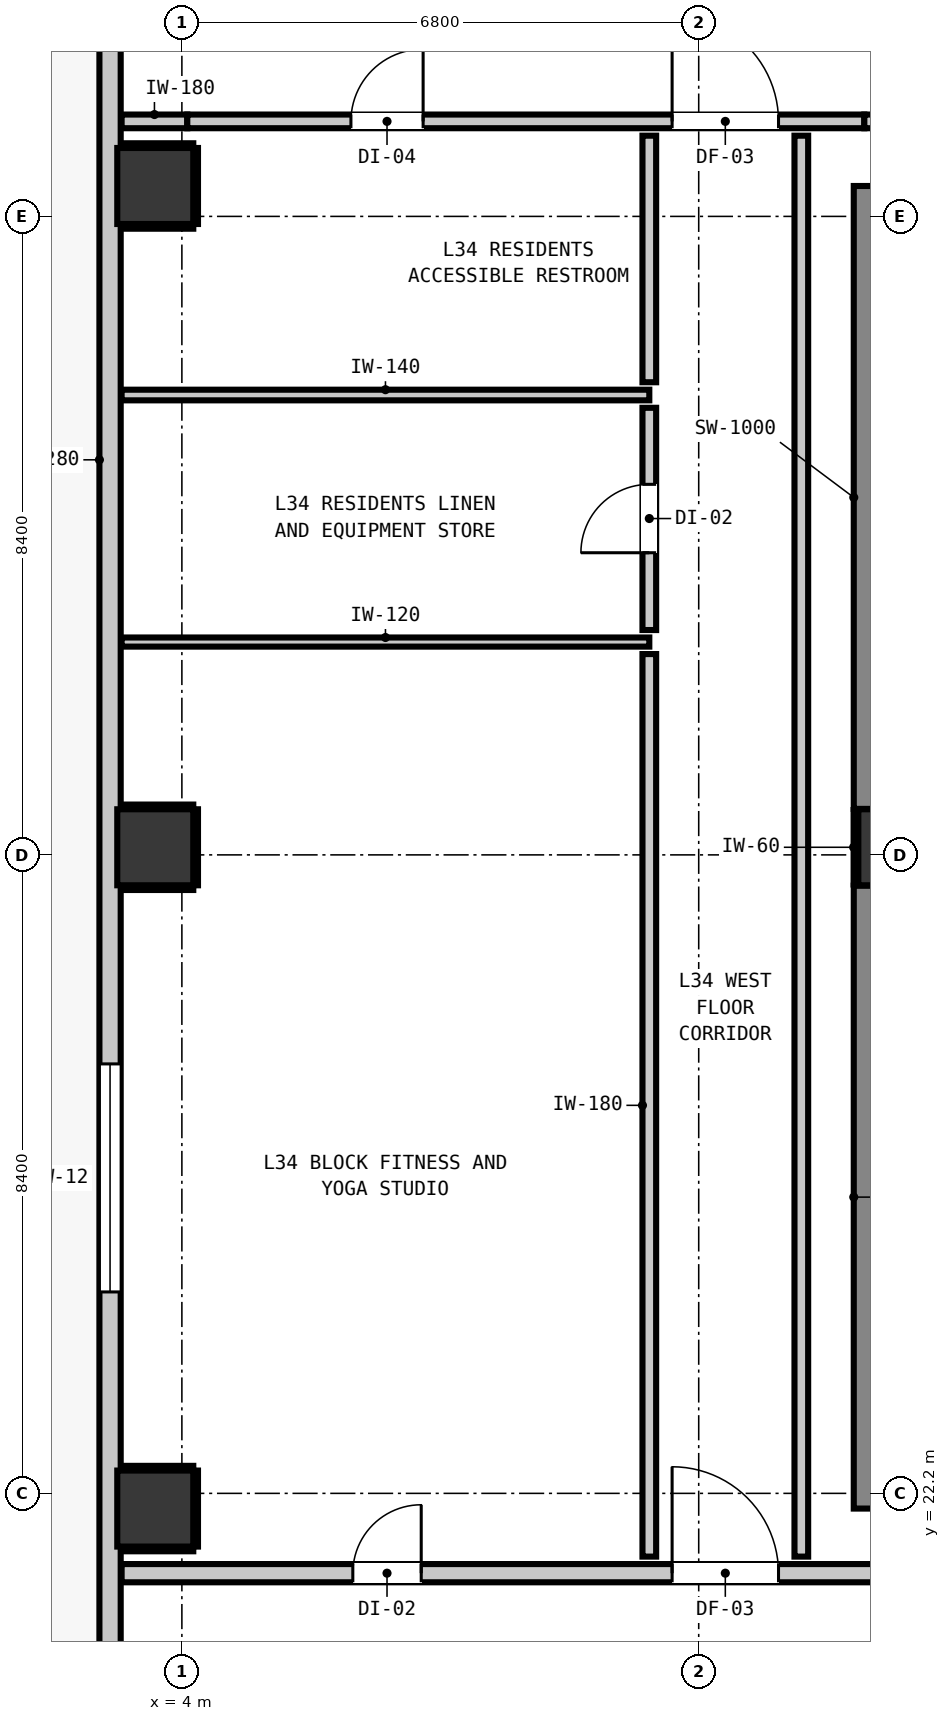
"""IFC4 building model, lengths in metres.
Left out: names, types, materials, properties, quantities, classifications, styles, units other than length and angle.
Written with IfcOpenShell. Run it as: python <this file> out.ifc"""

import sys

from ifc_helpers import new_model, si_unit, direction, frame, frame_2d, origin, origin_2d, place, context, subcontext, project, spatial, rectangle, extrude, element, fill, save


model = new_model("IFC4")
c1 = context("Model", 3, precision=1e-05, world=origin(), true_north=direction((0.0, 1.0)))
c2 = subcontext(c1, "Body", "Model", "MODEL_VIEW")
j1 = project(units=[si_unit("LENGTHUNIT", "METRE"), si_unit("PLANEANGLEUNIT", "RADIAN")], contexts=[c1])
p1 = place(None, origin())
s1 = spatial("IfcSite", under=j1, at=p1, CompositionType="ELEMENT")
p2 = place(p1, origin())
s2 = spatial("IfcBuilding", under=s1, at=p2, CompositionType="ELEMENT")
p3 = place(p2, frame((0.0, 0.0, 119.36)))
s3 = spatial("IfcBuildingStorey", under=s2, at=p3, CompositionType="ELEMENT", Elevation=119.36)
p4 = place(p3, frame((13.4, 30.7, 0.0), z_axis=(0.0, 0.0, 1.0), x_axis=(1.0, 0.0, 0.0)))
e1 = element("IfcColumn", 1, at=p4, inside=s3, PredefinedType="COLUMN", context=c2, shape_type="SweptSolid", body=[
    extrude(rectangle(XDim=1.0, YDim=1.0, at=origin_2d()), origin(), (0.0, 0.0, 1.0), 3.32),
])
p5 = place(p3, frame((13.34, 22.0, 0.0), z_axis=(0.0, 0.0, 1.0), x_axis=(0.0, 1.0, 0.0)))
e2 = element("IfcWall", 2, at=p5, inside=s3, PredefinedType="SHEAR", context=c2, shape_type="SweptSolid", body=[
    extrude(rectangle(XDim=8.195, YDim=1.0, at=frame_2d((4.098, 0.0))), origin(), (0.0, 0.0, 1.0), 3.32),
])
p6 = place(p3, frame((13.34, 31.205, 0.0), z_axis=(0.0, 0.0, 1.0), x_axis=(0.0, 1.0, 0.0)))
e3 = element("IfcWall", 3, at=p6, inside=s3, PredefinedType="SHEAR", context=c2, shape_type="SweptSolid", body=[
    extrude(rectangle(XDim=8.195, YDim=1.0, at=frame_2d((4.097, 0.0))), origin(), (0.0, 0.0, 1.0), 3.32),
])
for number, where, z_axis, x_axis in (
    (4, (3.65, 22.0, 0.0), (0.0, 0.0, 1.0), (1.0, 0.0, 0.0)),
    (5, (3.65, 30.7, 0.0), (0.0, 0.0, 1.0), (1.0, 0.0, 0.0)),
    (6, (3.65, 39.4, 0.0), (0.0, 0.0, 1.0), (1.0, 0.0, 0.0)),
):
    element("IfcColumn", number, at=place(p3, frame(where, z_axis=z_axis, x_axis=x_axis)), inside=s3, PredefinedType="COLUMN", context=c2, shape_type="SweptSolid", body=[
        extrude(rectangle(XDim=1.0, YDim=1.0, at=origin_2d()), origin(), (0.0, 0.0, 1.0), 3.32),
    ])
p7 = place(p3, frame((3.055, 11.355, 0.0), z_axis=(0.0, 0.0, 1.0), x_axis=(0.0, 1.0, 0.0)))
e7 = element("IfcWall", 7, at=p7, inside=s3, PredefinedType="STANDARD", context=c2, shape_type="SweptSolid", body=[
    extrude(rectangle(XDim=32.29, YDim=0.28, at=frame_2d((16.145, 0.0))), origin(), (0.0, 0.0, 1.0), 3.08),
])
p8 = place(p7, frame((5.818, 0.0, 0.0)))
e8 = element("IfcOpeningElement", 8, at=p8, cuts=e7, PredefinedType="OPENING", context=c2, shape_type="SweptSolid", body=[
    extrude(rectangle(XDim=1.0, YDim=2.15, at=frame_2d((0.5, 1.075))), frame((0.0, 0.15, 0.0), z_axis=(0.0, -1.0, 0.0), x_axis=(1.0, 0.0, 0.0)), (0.0, 0.0, 1.0), 0.3),
])
p9 = place(p7, frame((0.545, 0.0, 0.85)))
e9 = element("IfcOpeningElement", 9, at=p9, cuts=e7, PredefinedType="OPENING", context=c2, shape_type="SweptSolid", body=[
    extrude(rectangle(XDim=1.05, YDim=1.65, at=frame_2d((0.525, 0.825))), frame((0.0, 0.15, 0.0), z_axis=(0.0, -1.0, 0.0), x_axis=(1.0, 0.0, 0.0)), (0.0, 0.0, 1.0), 0.3),
])
p10 = place(p7, frame((13.495, 0.0, 0.85)))
e10 = element("IfcOpeningElement", 10, at=p10, cuts=e7, PredefinedType="OPENING", context=c2, shape_type="SweptSolid", body=[
    extrude(rectangle(XDim=3.0, YDim=2.1, at=frame_2d((1.5, 1.05))), frame((0.0, 0.15, 0.0), z_axis=(0.0, -1.0, 0.0), x_axis=(1.0, 0.0, 0.0)), (0.0, 0.0, 1.0), 0.3),
])
p11 = place(p3, frame((3.207, 21.15, 0.0), z_axis=(0.0, 0.0, 1.0), x_axis=(1.0, 0.0, 0.0)))
e11 = element("IfcWall", 11, at=p11, inside=s3, PredefinedType="PARTITIONING", context=c2, shape_type="SweptSolid", body=[
    extrude(rectangle(XDim=39.386, YDim=0.24, at=frame_2d((19.693, 0.0))), origin(), (0.0, 0.0, 1.0), 3.08),
])
p12 = place(p11, frame((15.003, 0.0, 0.0)))
e12 = element("IfcOpeningElement", 12, at=p12, cuts=e11, PredefinedType="OPENING", context=c2, shape_type="SweptSolid", body=[
    extrude(rectangle(XDim=1.1, YDim=2.15, at=frame_2d((0.55, 1.075))), frame((0.0, 0.13, 0.0), z_axis=(0.0, -1.0, 0.0), x_axis=(1.0, 0.0, 0.0)), (0.0, 0.0, 1.0), 0.26),
])
p13 = place(p11, frame((7.243, 0.0, 0.0)))
e13 = element("IfcOpeningElement", 13, at=p13, cuts=e11, PredefinedType="OPENING", context=c2, shape_type="SweptSolid", body=[
    extrude(rectangle(XDim=1.4, YDim=2.15, at=frame_2d((0.7, 1.075))), frame((0.0, 0.13, 0.0), z_axis=(0.0, -1.0, 0.0), x_axis=(1.0, 0.0, 0.0)), (0.0, 0.0, 1.0), 0.26),
])
p14 = place(p11, frame((34.843, 0.0, 0.0)))
e14 = element("IfcOpeningElement", 14, at=p14, cuts=e11, PredefinedType="OPENING", context=c2, shape_type="SweptSolid", body=[
    extrude(rectangle(XDim=1.4, YDim=2.15, at=frame_2d((0.7, 1.075))), frame((0.0, 0.13, 0.0), z_axis=(0.0, -1.0, 0.0), x_axis=(1.0, 0.0, 0.0)), (0.0, 0.0, 1.0), 0.26),
])
p15 = place(p11, frame((3.042, 0.0, 0.0)))
e15 = element("IfcOpeningElement", 15, at=p15, cuts=e11, PredefinedType="OPENING", context=c2, shape_type="SweptSolid", body=[
    extrude(rectangle(XDim=0.9, YDim=2.1, at=frame_2d((0.45, 1.05))), frame((0.0, 0.13, 0.0), z_axis=(0.0, -1.0, 0.0), x_axis=(1.0, 0.0, 0.0)), (0.0, 0.0, 1.0), 0.26),
])
p16 = place(p3, frame((3.207, 40.25, 0.0), z_axis=(0.0, 0.0, 1.0), x_axis=(1.0, 0.0, 0.0)))
e16 = element("IfcWall", 16, at=p16, inside=s3, PredefinedType="PARTITIONING", context=c2, shape_type="SweptSolid", body=[
    extrude(rectangle(XDim=0.864, YDim=0.18, at=frame_2d((0.432, 0.0))), origin(), (0.0, 0.0, 1.0), 3.08),
])
p17 = place(p3, frame((4.071, 40.25, 0.0), z_axis=(0.0, 0.0, 1.0), x_axis=(1.0, 0.0, 0.0)))
e17 = element("IfcWall", 17, at=p17, inside=s3, PredefinedType="PARTITIONING", context=c2, shape_type="SweptSolid", body=[
    extrude(rectangle(XDim=8.908, YDim=0.18, at=frame_2d((4.454, 0.0))), origin(), (0.0, 0.0, 1.0), 2.565),
])
p18 = place(p17, frame((6.379, 0.0, 0.0)))
e18 = element("IfcOpeningElement", 18, at=p18, cuts=e17, PredefinedType="OPENING", context=c2, shape_type="SweptSolid", body=[
    extrude(rectangle(XDim=1.4, YDim=2.15, at=frame_2d((0.7, 1.075))), frame((0.0, 0.1, 0.0), z_axis=(0.0, -1.0, 0.0), x_axis=(1.0, 0.0, 0.0)), (0.0, 0.0, 1.0), 0.2),
])
p19 = place(p17, frame((2.153, 0.0, 0.0)))
e19 = element("IfcOpeningElement", 19, at=p19, cuts=e17, PredefinedType="OPENING", context=c2, shape_type="SweptSolid", body=[
    extrude(rectangle(XDim=0.95, YDim=2.1, at=frame_2d((0.475, 1.05))), frame((0.0, 0.1, 0.0), z_axis=(0.0, -1.0, 0.0), x_axis=(1.0, 0.0, 0.0)), (0.0, 0.0, 1.0), 0.2),
])
p20 = place(p3, frame((12.979, 40.25, 0.0), z_axis=(0.0, 0.0, 1.0), x_axis=(1.0, 0.0, 0.0)))
e20 = element("IfcWall", 20, at=p20, inside=s3, PredefinedType="PARTITIONING", context=c2, shape_type="SweptSolid", body=[
    extrude(rectangle(XDim=29.614, YDim=0.18, at=frame_2d((14.807, 0.0))), origin(), (0.0, 0.0, 1.0), 3.08),
])
p21 = place(p20, frame((4.456, 0.0, 0.0)))
e21 = element("IfcOpeningElement", 21, at=p21, cuts=e20, PredefinedType="OPENING", context=c2, shape_type="SweptSolid", body=[
    extrude(rectangle(XDim=1.4, YDim=2.15, at=frame_2d((0.7, 1.075))), frame((0.0, 0.1, 0.0), z_axis=(0.0, -1.0, 0.0), x_axis=(1.0, 0.0, 0.0)), (0.0, 0.0, 1.0), 0.2),
])
p22 = place(p20, frame((25.071, 0.0, 0.0)))
e22 = element("IfcOpeningElement", 22, at=p22, cuts=e20, PredefinedType="OPENING", context=c2, shape_type="SweptSolid", body=[
    extrude(rectangle(XDim=1.4, YDim=2.15, at=frame_2d((0.7, 1.075))), frame((0.0, 0.1, 0.0), z_axis=(0.0, -1.0, 0.0), x_axis=(1.0, 0.0, 0.0)), (0.0, 0.0, 1.0), 0.2),
])
p23 = place(p20, frame((27.642, 0.0, 0.0)))
e23 = element("IfcOpeningElement", 23, at=p23, cuts=e20, PredefinedType="OPENING", context=c2, shape_type="SweptSolid", body=[
    extrude(rectangle(XDim=0.9, YDim=2.1, at=frame_2d((0.45, 1.05))), frame((0.0, 0.1, 0.0), z_axis=(0.0, -1.0, 0.0), x_axis=(1.0, 0.0, 0.0)), (0.0, 0.0, 1.0), 0.2),
])
p24 = place(p3, frame((3.207, 36.65, 0.0), z_axis=(0.0, 0.0, 1.0), x_axis=(1.0, 0.0, 0.0)))
e24 = element("IfcWall", 24, at=p24, inside=s3, PredefinedType="PARTITIONING", context=c2, shape_type="SweptSolid", body=[
    extrude(rectangle(XDim=6.943, YDim=0.14, at=frame_2d((3.471, 0.0))), origin(), (0.0, 0.0, 1.0), 3.08),
])
p25 = place(p3, frame((3.207, 33.4, 0.0), z_axis=(0.0, 0.0, 1.0), x_axis=(1.0, 0.0, 0.0)))
e25 = element("IfcWall", 25, at=p25, inside=s3, PredefinedType="PARTITIONING", context=c2, shape_type="SweptSolid", body=[
    extrude(rectangle(XDim=6.943, YDim=0.12, at=frame_2d((3.471, 0.0))), origin(), (0.0, 0.0, 1.0), 3.08),
])
p26 = place(p3, frame((10.15, 21.368, 0.0), z_axis=(0.0, 0.0, 1.0), x_axis=(0.0, 1.0, 0.0)))
e26 = element("IfcWall", 26, at=p26, inside=s3, PredefinedType="PARTITIONING", context=c2, shape_type="SweptSolid", body=[
    extrude(rectangle(XDim=11.874, YDim=0.18, at=frame_2d((5.937, 0.0))), origin(), (0.0, 0.0, 1.0), 3.08),
])
p27 = place(p3, frame((10.15, 33.558, 0.0), z_axis=(0.0, 0.0, 1.0), x_axis=(0.0, 1.0, 0.0)))
e27 = element("IfcWall", 27, at=p27, inside=s3, PredefinedType="PARTITIONING", context=c2, shape_type="SweptSolid", body=[
    extrude(rectangle(XDim=2.924, YDim=0.18, at=frame_2d((1.462, 0.0))), origin(), (0.0, 0.0, 1.0), 3.08),
])
p28 = place(p27, frame((1.017, 0.0, 0.0)))
e28 = element("IfcOpeningElement", 28, at=p28, cuts=e27, PredefinedType="OPENING", context=c2, shape_type="SweptSolid", body=[
    extrude(rectangle(XDim=0.9, YDim=2.1, at=frame_2d((0.45, 1.05))), frame((0.0, 0.1, 0.0), z_axis=(0.0, -1.0, 0.0), x_axis=(1.0, 0.0, 0.0)), (0.0, 0.0, 1.0), 0.2),
])
p29 = place(p3, frame((10.15, 36.818, 0.0), z_axis=(0.0, 0.0, 1.0), x_axis=(0.0, 1.0, 0.0)))
e29 = element("IfcWall", 29, at=p29, inside=s3, PredefinedType="PARTITIONING", context=c2, shape_type="SweptSolid", body=[
    extrude(rectangle(XDim=3.244, YDim=0.18, at=frame_2d((1.622, 0.0))), origin(), (0.0, 0.0, 1.0), 3.08),
])
p30 = place(p3, frame((12.15, 21.368, 0.0), z_axis=(0.0, 0.0, 1.0), x_axis=(0.0, 1.0, 0.0)))
e30 = element("IfcWall", 30, at=p30, inside=s3, PredefinedType="PARTITIONING", context=c2, shape_type="SweptSolid", body=[
    extrude(rectangle(XDim=18.694, YDim=0.18, at=frame_2d((9.347, 0.0))), origin(), (0.0, 0.0, 1.0), 3.08),
])
p31 = place(p3, frame((12.868, 30.21, 0.0), z_axis=(0.0, 0.0, 1.0), x_axis=(0.0, 1.0, 0.0)))
e31 = element("IfcWall", 31, at=p31, inside=s3, PredefinedType="PARTITIONING", context=c2, shape_type="SweptSolid", body=[
    extrude(rectangle(XDim=0.98, YDim=0.06, at=frame_2d((0.49, 0.0))), origin(), (0.0, 0.0, 1.0), 1.45),
])
for number, where, z_axis, x_axis in (
    (32, (3.21, 21.468, 0.0), (0.0, 0.0, 1.0), (1.0, 0.0, 0.0)),
    (33, (3.21, 22.532, 0.0), (0.0, 0.0, 1.0), (1.0, 0.0, 0.0)),
):
    element("IfcWall", number, at=place(p3, frame(where, z_axis=z_axis, x_axis=x_axis)), inside=s3, PredefinedType="PARTITIONING", context=c2, shape_type="SweptSolid", body=[
        extrude(rectangle(XDim=0.94, YDim=0.06, at=frame_2d((0.47, 0.0))), origin(), (0.0, 0.0, 1.0), 1.45),
    ])
p32 = place(p3, frame((4.182, 21.5, 0.0), z_axis=(0.0, 0.0, 1.0), x_axis=(0.0, 1.0, 0.0)))
e34 = element("IfcWall", 34, at=p32, inside=s3, PredefinedType="PARTITIONING", context=c2, shape_type="SweptSolid", body=[
    extrude(rectangle(XDim=1.0, YDim=0.06, at=frame_2d((0.5, 0.0))), origin(), (0.0, 0.0, 1.0), 1.45),
])
for number, where, z_axis, x_axis in (
    (35, (3.21, 30.168, 0.0), (0.0, 0.0, 1.0), (1.0, 0.0, 0.0)),
    (36, (3.21, 31.232, 0.0), (0.0, 0.0, 1.0), (1.0, 0.0, 0.0)),
):
    element("IfcWall", number, at=place(p3, frame(where, z_axis=z_axis, x_axis=x_axis)), inside=s3, PredefinedType="PARTITIONING", context=c2, shape_type="SweptSolid", body=[
        extrude(rectangle(XDim=0.94, YDim=0.06, at=frame_2d((0.47, 0.0))), origin(), (0.0, 0.0, 1.0), 1.45),
    ])
p33 = place(p3, frame((4.182, 30.2, 0.0), z_axis=(0.0, 0.0, 1.0), x_axis=(0.0, 1.0, 0.0)))
e37 = element("IfcWall", 37, at=p33, inside=s3, PredefinedType="PARTITIONING", context=c2, shape_type="SweptSolid", body=[
    extrude(rectangle(XDim=1.0, YDim=0.06, at=frame_2d((0.5, 0.0))), origin(), (0.0, 0.0, 1.0), 1.45),
])
for number, where, z_axis, x_axis in (
    (38, (3.21, 38.868, 0.0), (0.0, 0.0, 1.0), (1.0, 0.0, 0.0)),
    (39, (3.21, 39.932, 0.0), (0.0, 0.0, 1.0), (1.0, 0.0, 0.0)),
):
    element("IfcWall", number, at=place(p3, frame(where, z_axis=z_axis, x_axis=x_axis)), inside=s3, PredefinedType="PARTITIONING", context=c2, shape_type="SweptSolid", body=[
        extrude(rectangle(XDim=0.94, YDim=0.06, at=frame_2d((0.47, 0.0))), origin(), (0.0, 0.0, 1.0), 1.45),
    ])
p34 = place(p3, frame((4.182, 38.9, 0.0), z_axis=(0.0, 0.0, 1.0), x_axis=(0.0, 1.0, 0.0)))
e40 = element("IfcWall", 40, at=p34, inside=s3, PredefinedType="PARTITIONING", context=c2, shape_type="SweptSolid", body=[
    extrude(rectangle(XDim=1.0, YDim=0.06, at=frame_2d((0.5, 0.0))), origin(), (0.0, 0.0, 1.0), 1.45),
])
p35 = place(p10, origin())
e41 = element("IfcWindow", 41, at=p35, inside=s3, PartitioningType="SINGLE_PANEL", PredefinedType="WINDOW", context=c2, shape_type="SweptSolid", body=[
    extrude(rectangle(XDim=3.0, YDim=2.1, at=frame_2d((1.5, 1.05))), frame((0.0, 0.03, 0.0), z_axis=(0.0, -1.0, 0.0), x_axis=(1.0, 0.0, 0.0)), (0.0, 0.0, 1.0), 0.06),
])
fill(e10, e41)
p36 = place(p13, origin())
e42 = element("IfcDoor", 42, at=p36, inside=s3, OperationType="SINGLE_SWING_LEFT", PredefinedType="DOOR", context=c2, shape_type="SweptSolid", body=[
    extrude(rectangle(XDim=1.4, YDim=2.15, at=frame_2d((0.7, 1.075))), frame((0.0, 0.025, 0.0), z_axis=(0.0, -1.0, 0.0), x_axis=(1.0, 0.0, 0.0)), (0.0, 0.0, 1.0), 0.05),
])
fill(e13, e42)
p37 = place(p18, origin())
e43 = element("IfcDoor", 43, at=p37, inside=s3, OperationType="SINGLE_SWING_LEFT", PredefinedType="DOOR", context=c2, shape_type="SweptSolid", body=[
    extrude(rectangle(XDim=1.4, YDim=2.15, at=frame_2d((0.7, 1.075))), frame((0.0, 0.025, 0.0), z_axis=(0.0, -1.0, 0.0), x_axis=(1.0, 0.0, 0.0)), (0.0, 0.0, 1.0), 0.05),
])
fill(e18, e43)
p38 = place(p15, origin())
e44 = element("IfcDoor", 44, at=p38, inside=s3, OperationType="SINGLE_SWING_RIGHT", PredefinedType="DOOR", context=c2, shape_type="SweptSolid", body=[
    extrude(rectangle(XDim=0.9, YDim=2.1, at=frame_2d((0.45, 1.05))), frame((0.0, 0.025, 0.0), z_axis=(0.0, -1.0, 0.0), x_axis=(1.0, 0.0, 0.0)), (0.0, 0.0, 1.0), 0.05),
])
fill(e15, e44)
p39 = place(p28, origin())
e45 = element("IfcDoor", 45, at=p39, inside=s3, OperationType="SINGLE_SWING_LEFT", PredefinedType="DOOR", context=c2, shape_type="SweptSolid", body=[
    extrude(rectangle(XDim=0.9, YDim=2.1, at=frame_2d((0.45, 1.05))), frame((0.0, 0.025, 0.0), z_axis=(0.0, -1.0, 0.0), x_axis=(1.0, 0.0, 0.0)), (0.0, 0.0, 1.0), 0.05),
])
fill(e28, e45)
p40 = place(p19, origin())
e46 = element("IfcDoor", 46, at=p40, inside=s3, OperationType="SINGLE_SWING_RIGHT", PredefinedType="DOOR", context=c2, shape_type="SweptSolid", body=[
    extrude(rectangle(XDim=0.95, YDim=2.1, at=frame_2d((0.475, 1.05))), frame((0.0, 0.025, 0.0), z_axis=(0.0, -1.0, 0.0), x_axis=(1.0, 0.0, 0.0)), (0.0, 0.0, 1.0), 0.05),
])
fill(e19, e46)
save(model, sys.argv[1])
